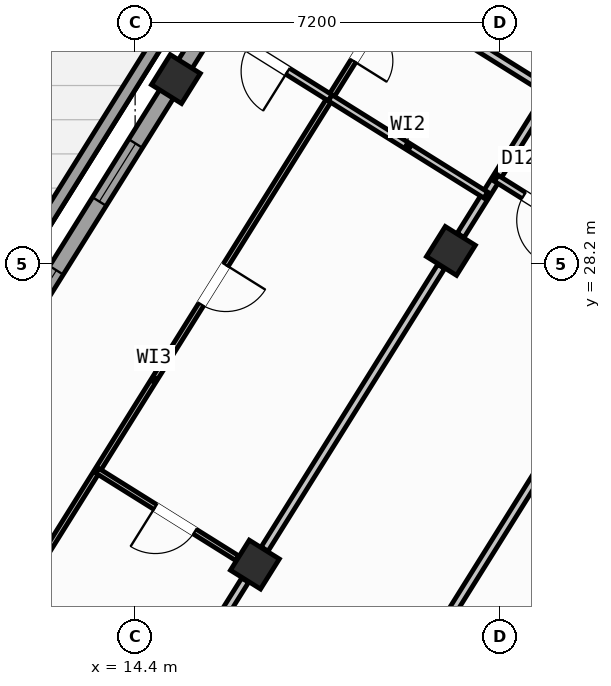
"""IFC4 building model, lengths in metres.
Left out: names, types, materials, properties, quantities, classifications, styles, units other than length and angle.
Written with IfcOpenShell. Run it as: python <this file> out.ifc"""

import sys

from ifc_helpers import new_model, si_unit, direction, frame, frame_2d, origin, origin_2d, place, context, subcontext, project, spatial, rectangle, hollow_rectangle, extrude, source, transform, mapped, element, fill, save


model = new_model("IFC4")
c1 = context("Model", 3, precision=1e-05, world=origin(), true_north=direction((0.0, 1.0)))
c2 = subcontext(c1, "Body", "Model", "MODEL_VIEW")
j1 = project(units=[si_unit("LENGTHUNIT", "METRE"), si_unit("PLANEANGLEUNIT", "RADIAN")], contexts=[c1])
p1 = place(None, origin())
s1 = spatial("IfcSite", under=j1, at=p1, CompositionType="ELEMENT")
p2 = place(p1, origin())
s2 = spatial("IfcBuilding", under=s1, at=p2, CompositionType="ELEMENT")
p3 = place(p2, frame((0.0, 0.0, 280.8)))
s3 = spatial("IfcBuildingStorey", under=s2, at=p3, CompositionType="ELEMENT", Elevation=280.8)
m1 = source(origin(), c2, "Body", "SweptSolid", [
    extrude(hollow_rectangle(XDim=0.7, YDim=0.7, WallThickness=0.028, at=origin_2d()), origin(), (0.0, 0.0, 1.0), 3.6),
])
for number, where, z_axis, x_axis in (
    (1, (20.632, 28.452, 0.0), (0.0, 0.0, 1.0), (-0.848, 0.53, 0.0)),
    (2, (16.764, 22.261, 0.0), (0.0, 0.0, 1.0), (-0.848, 0.53, 0.0)),
    (3, (15.205, 31.844, 0.0), (0.0, 0.0, 1.0), (-0.848, 0.53, 0.0)),
):
    element("IfcColumn", number, at=place(p3, frame(where, z_axis=z_axis, x_axis=x_axis)), inside=s3, PredefinedType="COLUMN", context=c2, shape_type="MappedRepresentation", body=[
        mapped(m1, transform((0.0, 0.0, 0.0), scale=1.0)),
    ])
p4 = place(p3, frame((3.451, 24.828, 0.0), z_axis=(0.0, 0.0, 1.0), x_axis=(0.529919162229, 0.848048159895, 0.0)))
e4 = element("IfcWall", 4, at=p4, inside=s3, PredefinedType="PARAPET", context=c2, shape_type="SweptSolid", body=[
    extrude(rectangle(XDim=18.156, YDim=0.24, at=frame_2d((9.078, 0.0))), origin(), (0.0, 0.0, 1.0), 1.15),
])
p5 = place(p3, frame((18.063, 37.72, 0.0), z_axis=(0.0, 0.0, 1.0), x_axis=(-0.529918910732, -0.848048317048, 0.0)))
e5 = element("IfcWall", 5, at=p5, inside=s3, PredefinedType="PARAPET", context=c2, shape_type="SweptSolid", body=[
    extrude(rectangle(XDim=19.196, YDim=0.24, at=frame_2d((9.598, 0.0))), origin(), (0.0, 0.0, 1.0), 1.15),
])
p6 = place(p3, frame((7.842, 20.061, 0.0), z_axis=(0.0, 0.0, 1.0), x_axis=(0.529915577903, 0.84805039962, 0.0)))
e6 = element("IfcWall", 6, at=p6, inside=s3, PredefinedType="STANDARD", context=c2, shape_type="SweptSolid", body=[
    extrude(rectangle(XDim=21.587, YDim=0.32, at=frame_2d((10.794, 0.0))), origin(), (0.0, 0.0, 1.0), 2.875),
])
p7 = place(p6, frame((2.606, 0.0, 0.9)))
e7 = element("IfcOpeningElement", 7, at=p7, cuts=e6, PredefinedType="OPENING", context=c2, shape_type="SweptSolid", body=[
    extrude(rectangle(XDim=1.65, YDim=1.45, at=frame_2d((0.825, 0.725))), frame((0.0, 0.17, 0.0), z_axis=(0.0, -1.0, 0.0), x_axis=(1.0, 0.0, 0.0)), (0.0, 0.0, 1.0), 0.34),
])
p8 = place(p6, frame((8.094, 0.0, 0.9)))
e8 = element("IfcOpeningElement", 8, at=p8, cuts=e6, PredefinedType="OPENING", context=c2, shape_type="SweptSolid", body=[
    extrude(rectangle(XDim=1.35, YDim=1.45, at=frame_2d((0.675, 0.725))), frame((0.0, 0.17, 0.0), z_axis=(0.0, -1.0, 0.0), x_axis=(1.0, 0.0, 0.0)), (0.0, 0.0, 1.0), 0.34),
])
p9 = place(p6, frame((11.044, 0.0, 0.9)))
e9 = element("IfcOpeningElement", 9, at=p9, cuts=e6, PredefinedType="OPENING", context=c2, shape_type="SweptSolid", body=[
    extrude(rectangle(XDim=1.35, YDim=1.45, at=frame_2d((0.675, 0.725))), frame((0.0, 0.17, 0.0), z_axis=(0.0, -1.0, 0.0), x_axis=(1.0, 0.0, 0.0)), (0.0, 0.0, 1.0), 0.34),
])
p10 = place(p6, frame((15.939, 0.0, 1.0)))
e10 = element("IfcOpeningElement", 10, at=p10, cuts=e6, PredefinedType="OPENING", context=c2, shape_type="SweptSolid", body=[
    extrude(rectangle(XDim=0.9, YDim=1.25, at=frame_2d((0.45, 0.625))), frame((0.0, 0.17, 0.0), z_axis=(0.0, -1.0, 0.0), x_axis=(1.0, 0.0, 0.0)), (0.0, 0.0, 1.0), 0.34),
])
p11 = place(p3, frame((19.566, 38.434, 0.0), z_axis=(0.0, 0.0, 1.0), x_axis=(0.84804567626, -0.529923136858, 0.0)))
e11 = element("IfcWall", 11, at=p11, inside=s3, PredefinedType="STANDARD", context=c2, shape_type="SweptSolid", body=[
    extrude(rectangle(XDim=25.188, YDim=0.32, at=frame_2d((12.594, 0.0))), origin(), (0.0, 0.0, 1.0), 3.35),
])
p12 = place(p11, frame((3.355, 0.0, 0.0)))
e12 = element("IfcOpeningElement", 12, at=p12, cuts=e11, PredefinedType="OPENING", context=c2, shape_type="SweptSolid", body=[
    extrude(rectangle(XDim=1.05, YDim=2.15, at=frame_2d((0.525, 1.075))), frame((0.0, 0.17, 0.0), z_axis=(0.0, -1.0, 0.0), x_axis=(1.0, 0.0, 0.0)), (0.0, 0.0, 1.0), 0.34),
])
p13 = place(p11, frame((0.939, 0.0, 0.9)))
e13 = element("IfcOpeningElement", 13, at=p13, cuts=e11, PredefinedType="OPENING", context=c2, shape_type="SweptSolid", body=[
    extrude(rectangle(XDim=1.65, YDim=1.45, at=frame_2d((0.825, 0.725))), frame((0.0, 0.17, 0.0), z_axis=(0.0, -1.0, 0.0), x_axis=(1.0, 0.0, 0.0)), (0.0, 0.0, 1.0), 0.34),
])
p14 = place(p11, frame((7.499, 0.0, 0.9)))
e14 = element("IfcOpeningElement", 14, at=p14, cuts=e11, PredefinedType="OPENING", context=c2, shape_type="SweptSolid", body=[
    extrude(rectangle(XDim=1.35, YDim=1.45, at=frame_2d((0.675, 0.725))), frame((0.0, 0.17, 0.0), z_axis=(0.0, -1.0, 0.0), x_axis=(1.0, 0.0, 0.0)), (0.0, 0.0, 1.0), 0.34),
])
p15 = place(p11, frame((10.754, 0.0, 1.0)))
e15 = element("IfcOpeningElement", 15, at=p15, cuts=e11, PredefinedType="OPENING", context=c2, shape_type="SweptSolid", body=[
    extrude(rectangle(XDim=0.9, YDim=1.25, at=frame_2d((0.45, 0.625))), frame((0.0, 0.17, 0.0), z_axis=(0.0, -1.0, 0.0), x_axis=(1.0, 0.0, 0.0)), (0.0, 0.0, 1.0), 0.34),
])
p16 = place(p11, frame((15.694, 0.0, 1.0)))
e16 = element("IfcOpeningElement", 16, at=p16, cuts=e11, PredefinedType="OPENING", context=c2, shape_type="SweptSolid", body=[
    extrude(rectangle(XDim=0.9, YDim=1.25, at=frame_2d((0.45, 0.625))), frame((0.0, 0.17, 0.0), z_axis=(0.0, -1.0, 0.0), x_axis=(1.0, 0.0, 0.0)), (0.0, 0.0, 1.0), 0.34),
])
p17 = place(p11, frame((21.394, 0.0, 1.0)))
e17 = element("IfcOpeningElement", 17, at=p17, cuts=e11, PredefinedType="OPENING", context=c2, shape_type="SweptSolid", body=[
    extrude(rectangle(XDim=0.9, YDim=1.25, at=frame_2d((0.45, 0.625))), frame((0.0, 0.17, 0.0), z_axis=(0.0, -1.0, 0.0), x_axis=(1.0, 0.0, 0.0)), (0.0, 0.0, 1.0), 0.34),
])
p18 = place(p3, frame((25.807, 29.582, 0.0), z_axis=(0.0, 0.0, 1.0), x_axis=(-0.529918119251, -0.84804881162, 0.0)))
e18 = element("IfcWall", 18, at=p18, inside=s3, PredefinedType="PARTITIONING", context=c2, shape_type="SweptSolid", body=[
    extrude(rectangle(XDim=17.65, YDim=0.16, at=frame_2d((8.825, 0.0))), origin(), (0.0, 0.0, 1.0), 3.34),
])
p19 = place(p3, frame((26.973, 31.447, 0.0), z_axis=(0.0, 0.0, 1.0), x_axis=(-0.84805406617, 0.529909710094, 0.0)))
e19 = element("IfcWall", 19, at=p19, inside=s3, PredefinedType="PARTITIONING", context=c2, shape_type="SweptSolid", body=[
    extrude(rectangle(XDim=10.33, YDim=0.16, at=frame_2d((5.165, 0.0))), origin(), (0.0, 0.0, 1.0), 3.34),
])
p20 = place(p19, frame((1.459, 0.0, 0.0)))
e20 = element("IfcOpeningElement", 20, at=p20, cuts=e19, PredefinedType="OPENING", context=c2, shape_type="SweptSolid", body=[
    extrude(rectangle(XDim=1.0, YDim=2.1, at=frame_2d((0.5, 1.05))), frame((0.0, 0.09, 0.0), z_axis=(0.0, -1.0, 0.0), x_axis=(1.0, 0.0, 0.0)), (0.0, 0.0, 1.0), 0.18),
])
p21 = place(p19, frame((6.614, 0.0, 0.0)))
e21 = element("IfcOpeningElement", 21, at=p21, cuts=e19, PredefinedType="OPENING", context=c2, shape_type="SweptSolid", body=[
    extrude(rectangle(XDim=1.0, YDim=2.1, at=frame_2d((0.5, 1.05))), frame((0.0, 0.09, 0.0), z_axis=(0.0, -1.0, 0.0), x_axis=(1.0, 0.0, 0.0)), (0.0, 0.0, 1.0), 0.18),
])
p22 = place(p3, frame((25.807, 29.582, 0.0), z_axis=(0.0, 0.0, 1.0), x_axis=(-0.848060702647, 0.529899089097, 0.0)))
e22 = element("IfcWall", 22, at=p22, inside=s3, PredefinedType="PARTITIONING", context=c2, shape_type="SweptSolid", body=[
    extrude(rectangle(XDim=10.33, YDim=0.16, at=frame_2d((5.165, 0.0))), origin(), (0.0, 0.0, 1.0), 3.34),
])
p23 = place(p22, frame((2.22, 0.0, 0.0)))
e23 = element("IfcOpeningElement", 23, at=p23, cuts=e22, PredefinedType="OPENING", context=c2, shape_type="SweptSolid", body=[
    extrude(rectangle(XDim=0.86, YDim=2.05, at=frame_2d((0.43, 1.025))), frame((0.0, 0.09, 0.0), z_axis=(0.0, -1.0, 0.0), x_axis=(1.0, 0.0, 0.0)), (0.0, 0.0, 1.0), 0.18),
])
p24 = place(p22, frame((8.36, 0.0, 0.0)))
e24 = element("IfcOpeningElement", 24, at=p24, cuts=e22, PredefinedType="OPENING", context=c2, shape_type="SweptSolid", body=[
    extrude(rectangle(XDim=1.0, YDim=2.1, at=frame_2d((0.5, 1.05))), frame((0.0, 0.09, 0.0), z_axis=(0.0, -1.0, 0.0), x_axis=(1.0, 0.0, 0.0)), (0.0, 0.0, 1.0), 0.18),
])
p25 = place(p3, frame((22.593, 31.59, 0.0), z_axis=(0.0, 0.0, 1.0), x_axis=(-0.529900320499, -0.848059933221, 0.0)))
e25 = element("IfcWall", 25, at=p25, inside=s3, PredefinedType="PARTITIONING", context=c2, shape_type="SweptSolid", body=[
    extrude(rectangle(XDim=3.338, YDim=0.16, at=frame_2d((1.669, 0.0))), origin(), (0.0, 0.0, 1.0), 2.875),
])
p26 = place(p3, frame((20.44, 28.145, 0.0), z_axis=(0.0, 0.0, 1.0), x_axis=(-0.529938869374, -0.84803584519, 0.0)))
e26 = element("IfcWall", 26, at=p26, inside=s3, PredefinedType="PARTITIONING", context=c2, shape_type="SweptSolid", body=[
    extrude(rectangle(XDim=6.576, YDim=0.16, at=frame_2d((3.288, 0.0))), origin(), (0.0, 0.0, 1.0), 2.875),
])
p27 = place(p3, frame((16.572, 21.954, 0.0), z_axis=(0.0, 0.0, 1.0), x_axis=(-0.529904903214, -0.848057069748, 0.0)))
e27 = element("IfcWall", 27, at=p27, inside=s3, PredefinedType="PARTITIONING", context=c2, shape_type="SweptSolid", body=[
    extrude(rectangle(XDim=5.601, YDim=0.16, at=frame_2d((2.801, 0.0))), origin(), (0.0, 0.0, 1.0), 2.875),
])
p28 = place(p3, frame((24.742, 27.877, 0.0), z_axis=(0.0, 0.0, 1.0), x_axis=(-0.848059820872, 0.529900500304, 0.0)))
e28 = element("IfcWall", 28, at=p28, inside=s3, PredefinedType="PLUMBINGWALL", context=c2, shape_type="SweptSolid", body=[
    extrude(rectangle(XDim=3.79, YDim=0.14, at=frame_2d((1.895, 0.0))), origin(), (0.0, 0.0, 1.0), 3.34),
])
p29 = place(p28, frame((2.23, 0.0, 0.0)))
e29 = element("IfcOpeningElement", 29, at=p29, cuts=e28, PredefinedType="OPENING", context=c2, shape_type="SweptSolid", body=[
    extrude(rectangle(XDim=0.92, YDim=2.08, at=frame_2d((0.46, 1.04))), frame((0.0, 0.08, 0.0), z_axis=(0.0, -1.0, 0.0), x_axis=(1.0, 0.0, 0.0)), (0.0, 0.0, 1.0), 0.16),
])
p30 = place(p3, frame((19.523, 33.508, 0.0), z_axis=(0.0, 0.0, 1.0), x_axis=(-0.529910765222, -0.848053406869, 0.0)))
e30 = element("IfcWall", 30, at=p30, inside=s3, PredefinedType="PARTITIONING", context=c2, shape_type="SweptSolid", body=[
    extrude(rectangle(XDim=17.92, YDim=0.11, at=frame_2d((8.96, 0.0))), origin(), (0.0, 0.0, 1.0), 3.34),
])
p31 = place(p30, frame((0.76, 0.0, 0.0)))
e31 = element("IfcOpeningElement", 31, at=p31, cuts=e30, PredefinedType="OPENING", context=c2, shape_type="SweptSolid", body=[
    extrude(rectangle(XDim=0.78, YDim=2.05, at=frame_2d((0.39, 1.025))), frame((0.0, 0.065, 0.0), z_axis=(0.0, -1.0, 0.0), x_axis=(1.0, 0.0, 0.0)), (0.0, 0.0, 1.0), 0.13),
])
p32 = place(p30, frame((6.289, 0.0, 0.0)))
e32 = element("IfcOpeningElement", 32, at=p32, cuts=e30, PredefinedType="OPENING", context=c2, shape_type="SweptSolid", body=[
    extrude(rectangle(XDim=0.92, YDim=2.08, at=frame_2d((0.46, 1.04))), frame((0.0, 0.065, 0.0), z_axis=(0.0, -1.0, 0.0), x_axis=(1.0, 0.0, 0.0)), (0.0, 0.0, 1.0), 0.13),
])
p33 = place(p3, frame((18.251, 31.473, 0.0), z_axis=(0.0, 0.0, 1.0), x_axis=(-0.848059786386, 0.529900555496, 0.0)))
e33 = element("IfcWall", 33, at=p33, inside=s3, PredefinedType="PLUMBINGWALL", context=c2, shape_type="SweptSolid", body=[
    extrude(rectangle(XDim=2.9, YDim=0.14, at=frame_2d((1.45, 0.0))), origin(), (0.0, 0.0, 1.0), 3.34),
])
p34 = place(p33, frame((0.99, 0.0, 0.0)))
e34 = element("IfcOpeningElement", 34, at=p34, cuts=e33, PredefinedType="OPENING", context=c2, shape_type="SweptSolid", body=[
    extrude(rectangle(XDim=0.92, YDim=2.08, at=frame_2d((0.46, 1.04))), frame((0.0, 0.08, 0.0), z_axis=(0.0, -1.0, 0.0), x_axis=(1.0, 0.0, 0.0)), (0.0, 0.0, 1.0), 0.16),
])
p35 = place(p3, frame((21.321, 29.554, 0.0), z_axis=(0.0, 0.0, 1.0), x_axis=(-0.848021036626, 0.529962566074, 0.0)))
e35 = element("IfcWall", 35, at=p35, inside=s3, PredefinedType="PLUMBINGWALL", context=c2, shape_type="SweptSolid", body=[
    extrude(rectangle(XDim=3.62, YDim=0.14, at=frame_2d((1.81, 0.0))), origin(), (0.0, 0.0, 1.0), 3.34),
])
p36 = place(p3, frame((16.416, 22.388, 0.0), z_axis=(0.0, 0.0, 1.0), x_axis=(-0.84806986598, 0.529884423641, 0.0)))
e36 = element("IfcWall", 36, at=p36, inside=s3, PredefinedType="PARTITIONING", context=c2, shape_type="SweptSolid", body=[
    extrude(rectangle(XDim=3.258, YDim=0.11, at=frame_2d((1.629, 0.0))), origin(), (0.0, 0.0, 1.0), 2.875),
])
p37 = place(p36, frame((0.988, 0.0, 0.0)))
e37 = element("IfcOpeningElement", 37, at=p37, cuts=e36, PredefinedType="OPENING", context=c2, shape_type="SweptSolid", body=[
    extrude(rectangle(XDim=0.92, YDim=2.08, at=frame_2d((0.46, 1.04))), frame((0.0, 0.065, 0.0), z_axis=(0.0, -1.0, 0.0), x_axis=(1.0, 0.0, 0.0)), (0.0, 0.0, 1.0), 0.13),
])
m2 = source(origin(), c2, "Body", "SweptSolid", [
    extrude(rectangle(XDim=1.35, YDim=1.45, at=frame_2d((0.675, 0.725))), frame((0.0, 0.03, 0.0), z_axis=(0.0, -1.0, 0.0), x_axis=(1.0, 0.0, 0.0)), (0.0, 0.0, 1.0), 0.06),
])
p38 = place(p8, origin())
e38 = element("IfcWindow", 38, at=p38, inside=s3, PartitioningType="SINGLE_PANEL", PredefinedType="WINDOW", context=c2, shape_type="MappedRepresentation", body=[
    mapped(m2, transform((0.0, 0.0, 0.0), scale=1.0)),
])
fill(e8, e38)
p39 = place(p9, origin())
e39 = element("IfcWindow", 39, at=p39, inside=s3, PartitioningType="SINGLE_PANEL", PredefinedType="WINDOW", context=c2, shape_type="MappedRepresentation", body=[
    mapped(m2, transform((0.0, 0.0, 0.0), scale=1.0)),
])
fill(e9, e39)
m3 = source(origin(), c2, "Body", "SweptSolid", [
    extrude(rectangle(XDim=0.92, YDim=2.08, at=frame_2d((0.46, 1.04))), frame((0.0, 0.025, 0.0), z_axis=(0.0, -1.0, 0.0), x_axis=(1.0, 0.0, 0.0)), (0.0, 0.0, 1.0), 0.05),
])
p40 = place(p29, origin())
e40 = element("IfcDoor", 40, at=p40, inside=s3, OperationType="SINGLE_SWING_LEFT", PredefinedType="DOOR", context=c2, shape_type="MappedRepresentation", body=[
    mapped(m3, transform((0.0, 0.0, 0.0), scale=1.0)),
])
fill(e29, e40)
p41 = place(p34, origin())
e41 = element("IfcDoor", 41, at=p41, inside=s3, OperationType="SINGLE_SWING_LEFT", PredefinedType="DOOR", context=c2, shape_type="MappedRepresentation", body=[
    mapped(m3, transform((0.0, 0.0, 0.0), scale=1.0)),
])
fill(e34, e41)
m4 = source(origin(), c2, "Body", "SweptSolid", [
    extrude(rectangle(XDim=0.78, YDim=2.05, at=frame_2d((0.39, 1.025))), frame((0.0, 0.025, 0.0), z_axis=(0.0, -1.0, 0.0), x_axis=(1.0, 0.0, 0.0)), (0.0, 0.0, 1.0), 0.05),
])
p42 = place(p31, origin())
e42 = element("IfcDoor", 42, at=p42, inside=s3, OperationType="SINGLE_SWING_RIGHT", PredefinedType="DOOR", context=c2, shape_type="MappedRepresentation", body=[
    mapped(m4, transform((0.0, 0.0, 0.0), scale=1.0)),
])
fill(e31, e42)
p43 = place(p32, origin())
e43 = element("IfcDoor", 43, at=p43, inside=s3, OperationType="SINGLE_SWING_LEFT", PredefinedType="DOOR", context=c2, shape_type="MappedRepresentation", body=[
    mapped(m3, transform((0.0, 0.0, 0.0), scale=1.0)),
])
fill(e32, e43)
p44 = place(p37, origin())
e44 = element("IfcDoor", 44, at=p44, inside=s3, OperationType="SINGLE_SWING_RIGHT", PredefinedType="DOOR", context=c2, shape_type="MappedRepresentation", body=[
    mapped(m3, transform((0.0, 0.0, 0.0), scale=1.0)),
])
fill(e37, e44)
save(model, sys.argv[1])
